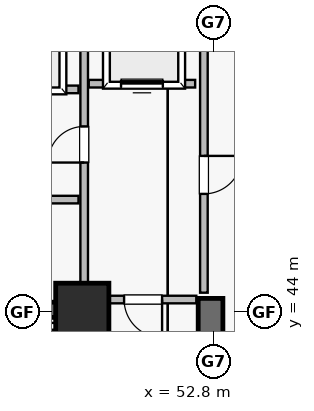
"""IFC4 building model, lengths in metres.
Left out: names, types, materials, properties, quantities, classifications, styles, units other than length and angle.
Written with IfcOpenShell. Run it as: python <this file> out.ifc"""

import sys

from ifc_helpers import new_model, si_unit, direction, frame, frame_2d, origin, origin_2d, place, context, subcontext, project, spatial, rectangle, extrude, element, fill, save


model = new_model("IFC4")
c1 = context("Model", 3, precision=1e-05, world=origin(), true_north=direction((0.0, 1.0)))
c2 = subcontext(c1, "Body", "Model", "MODEL_VIEW")
j1 = project(units=[si_unit("LENGTHUNIT", "METRE"), si_unit("PLANEANGLEUNIT", "RADIAN")], contexts=[c1])
p1 = place(None, origin())
s1 = spatial("IfcSite", under=j1, at=p1, CompositionType="ELEMENT")
p2 = place(p1, origin())
s2 = spatial("IfcBuilding", under=s1, at=p2, CompositionType="ELEMENT")
p3 = place(p2, frame((0.0, 0.0, -15.6)))
s3 = spatial("IfcBuildingStorey", under=s2, at=p3, CompositionType="ELEMENT", Elevation=-15.6)
p4 = place(p3, frame((52.725, 34.95, 0.0), z_axis=(0.0, 0.0, 1.0), x_axis=(0.0, 1.0, 0.0)))
e1 = element("IfcWall", 1, at=p4, inside=s3, PredefinedType="SHEAR", context=c2, shape_type="SweptSolid", body=[
    extrude(rectangle(XDim=9.4, YDim=0.65, at=frame_2d((4.7, 0.0))), origin(), (0.0, 0.0, 1.0), 3.58),
])
p5 = place(p3, frame((49.225, 35.4, 0.0), z_axis=(0.0, 0.0, 1.0), x_axis=(0.0, 1.0, 0.0)))
e2 = element("IfcWall", 2, at=p5, inside=s3, PredefinedType="SHEAR", context=c2, shape_type="SweptSolid", body=[
    extrude(rectangle(XDim=8.95, YDim=0.65, at=frame_2d((4.475, 0.0))), origin(), (0.0, 0.0, 1.0), 3.58),
])
p6 = place(p3, frame((45.05, 44.05, 0.0), z_axis=(0.0, 0.0, 1.0), x_axis=(1.0, 0.0, 0.0)))
e3 = element("IfcWall", 3, at=p6, inside=s3, PredefinedType="SHEAR", context=c2, shape_type="SweptSolid", body=[
    extrude(rectangle(XDim=4.2, YDim=0.4, at=frame_2d((2.1, 0.0))), origin(), (0.0, 0.0, 1.0), 3.58),
])
p7 = place(p3, frame((49.35, 44.05, 0.0), z_axis=(0.0, 0.0, 1.0), x_axis=(1.0, 0.0, 0.0)))
e4 = element("IfcColumn", 4, at=p7, inside=s3, PredefinedType="COLUMN", context=c2, shape_type="SweptSolid", body=[
    extrude(rectangle(XDim=1.4, YDim=1.4, at=origin_2d()), origin(), (0.0, 0.0, 1.0), 3.9),
])
p8 = place(p3, frame((52.55, 44.5, 0.0), z_axis=(0.0, 0.0, 1.0), x_axis=(0.0, 1.0, 0.0)))
e5 = element("IfcWall", 5, at=p8, inside=s3, PredefinedType="SOLIDWALL", context=c2, shape_type="SweptSolid", body=[
    extrude(rectangle(XDim=7.92, YDim=0.2, at=frame_2d((3.96, 0.0))), origin(), (0.0, 0.0, 1.0), 3.58),
])
p9 = place(p8, frame((2.6, 0.0, 0.0)))
e6 = element("IfcOpeningElement", 6, at=p9, cuts=e5, PredefinedType="OPENING", context=c2, shape_type="SweptSolid", body=[
    extrude(rectangle(XDim=1.0, YDim=2.15, at=frame_2d((0.5, 1.075))), frame((0.0, 0.11, 0.0), z_axis=(0.0, -1.0, 0.0), x_axis=(1.0, 0.0, 0.0)), (0.0, 0.0, 1.0), 0.22),
])
p10 = place(p3, frame((49.4, 44.5, 0.0), z_axis=(0.0, 0.0, 1.0), x_axis=(0.0, 1.0, 0.0)))
e7 = element("IfcWall", 7, at=p10, inside=s3, PredefinedType="SOLIDWALL", context=c2, shape_type="SweptSolid", body=[
    extrude(rectangle(XDim=7.92, YDim=0.2, at=frame_2d((3.96, 0.0))), origin(), (0.0, 0.0, 1.0), 3.58),
])
p11 = place(p10, frame((3.425, 0.0, 0.0)))
e8 = element("IfcOpeningElement", 8, at=p11, cuts=e7, PredefinedType="OPENING", context=c2, shape_type="SweptSolid", body=[
    extrude(rectangle(XDim=0.95, YDim=2.15, at=frame_2d((0.475, 1.075))), frame((0.0, 0.11, 0.0), z_axis=(0.0, -1.0, 0.0), x_axis=(1.0, 0.0, 0.0)), (0.0, 0.0, 1.0), 0.22),
])
p12 = place(p3, frame((44.25, 49.85, 0.0), z_axis=(0.0, 0.0, 1.0), x_axis=(1.0, 0.0, 0.0)))
e9 = element("IfcWall", 9, at=p12, inside=s3, PredefinedType="SOLIDWALL", context=c2, shape_type="SweptSolid", body=[
    extrude(rectangle(XDim=5.0, YDim=0.2, at=frame_2d((2.5, 0.0))), origin(), (0.0, 0.0, 1.0), 2.918),
])
p13 = place(p12, frame((0.525, 0.0, 0.0)))
e10 = element("IfcOpeningElement", 10, at=p13, cuts=e9, PredefinedType="OPENING", context=c2, shape_type="SweptSolid", body=[
    extrude(rectangle(XDim=0.85, YDim=2.1, at=frame_2d((0.425, 1.05))), frame((0.0, 0.11, 0.0), z_axis=(0.0, -1.0, 0.0), x_axis=(1.0, 0.0, 0.0)), (0.0, 0.0, 1.0), 0.22),
])
p14 = place(p12, frame((2.95, 0.0, 0.0)))
e11 = element("IfcOpeningElement", 11, at=p14, cuts=e9, PredefinedType="OPENING", context=c2, shape_type="SweptSolid", body=[
    extrude(rectangle(XDim=1.1, YDim=2.15, at=frame_2d((0.55, 1.075))), frame((0.0, 0.11, 0.0), z_axis=(0.0, -1.0, 0.0), x_axis=(1.0, 0.0, 0.0)), (0.0, 0.0, 1.0), 0.22),
])
p15 = place(p3, frame((45.32, 46.95, 0.0), z_axis=(0.0, 0.0, 1.0), x_axis=(1.0, 0.0, 0.0)))
e12 = element("IfcWall", 12, at=p15, inside=s3, PredefinedType="SOLIDWALL", context=c2, shape_type="SweptSolid", body=[
    extrude(rectangle(XDim=3.93, YDim=0.2, at=frame_2d((1.965, 0.0))), origin(), (0.0, 0.0, 1.0), 2.918),
])
p16 = place(p15, frame((1.475, 0.0, 0.0)))
e13 = element("IfcOpeningElement", 13, at=p16, cuts=e12, PredefinedType="OPENING", context=c2, shape_type="SweptSolid", body=[
    extrude(rectangle(XDim=0.95, YDim=2.15, at=frame_2d((0.475, 1.075))), frame((0.0, 0.11, 0.0), z_axis=(0.0, -1.0, 0.0), x_axis=(1.0, 0.0, 0.0)), (0.0, 0.0, 1.0), 0.22),
])
p17 = place(p3, frame((49.55, 44.32, 0.0), z_axis=(0.0, 0.0, 1.0), x_axis=(1.0, 0.0, 0.0)))
e14 = element("IfcWall", 14, at=p17, inside=s3, PredefinedType="SOLIDWALL", context=c2, shape_type="SweptSolid", body=[
    extrude(rectangle(XDim=2.8, YDim=0.2, at=frame_2d((1.4, 0.0))), origin(), (0.0, 0.0, 1.0), 3.58),
])
p18 = place(p17, frame((0.9, 0.0, 0.0)))
e15 = element("IfcOpeningElement", 15, at=p18, cuts=e14, PredefinedType="OPENING", context=c2, shape_type="SweptSolid", body=[
    extrude(rectangle(XDim=1.0, YDim=2.15, at=frame_2d((0.5, 1.075))), frame((0.0, 0.11, 0.0), z_axis=(0.0, -1.0, 0.0), x_axis=(1.0, 0.0, 0.0)), (0.0, 0.0, 1.0), 0.22),
])
p19 = place(p3, frame((49.52, 50.0, 0.0), z_axis=(0.0, 0.0, 1.0), x_axis=(1.0, 0.0, 0.0)))
e16 = element("IfcWall", 16, at=p19, inside=s3, PredefinedType="SOLIDWALL", context=c2, shape_type="SweptSolid", body=[
    extrude(rectangle(XDim=2.8, YDim=0.2, at=frame_2d((1.4, 0.0))), origin(), (0.0, 0.0, 1.0), 3.58),
])
p20 = place(p19, frame((0.85, 0.0, 0.0)))
e17 = element("IfcOpeningElement", 17, at=p20, cuts=e16, PredefinedType="OPENING", context=c2, shape_type="SweptSolid", body=[
    extrude(rectangle(XDim=1.1, YDim=2.15, at=frame_2d((0.55, 1.075))), frame((0.0, 0.11, 0.0), z_axis=(0.0, -1.0, 0.0), x_axis=(1.0, 0.0, 0.0)), (0.0, 0.0, 1.0), 0.22),
])
p21 = place(p18, frame((1.0, 0.0, 0.0), z_axis=(0.0, 0.0, 1.0), x_axis=(-1.0, 0.0, 0.0)))
e18 = element("IfcDoor", 18, at=p21, inside=s3, OperationType="SINGLE_SWING_RIGHT", PredefinedType="DOOR", context=c2, shape_type="SweptSolid", body=[
    extrude(rectangle(XDim=1.0, YDim=2.15, at=frame_2d((0.5, 1.075))), frame((0.0, 0.025, 0.0), z_axis=(0.0, -1.0, 0.0), x_axis=(1.0, 0.0, 0.0)), (0.0, 0.0, 1.0), 0.05),
])
fill(e15, e18)
p22 = place(p9, frame((1.0, 0.0, 0.0), z_axis=(0.0, 0.0, 1.0), x_axis=(-1.0, 0.0, 0.0)))
e19 = element("IfcDoor", 19, at=p22, inside=s3, OperationType="SINGLE_SWING_RIGHT", PredefinedType="DOOR", context=c2, shape_type="SweptSolid", body=[
    extrude(rectangle(XDim=1.0, YDim=2.15, at=frame_2d((0.5, 1.075))), frame((0.0, 0.025, 0.0), z_axis=(0.0, -1.0, 0.0), x_axis=(1.0, 0.0, 0.0)), (0.0, 0.0, 1.0), 0.05),
])
fill(e6, e19)
p23 = place(p11, origin())
e20 = element("IfcDoor", 20, at=p23, inside=s3, OperationType="SINGLE_SWING_LEFT", PredefinedType="DOOR", context=c2, shape_type="SweptSolid", body=[
    extrude(rectangle(XDim=0.95, YDim=2.15, at=frame_2d((0.475, 1.075))), frame((0.0, 0.025, 0.0), z_axis=(0.0, -1.0, 0.0), x_axis=(1.0, 0.0, 0.0)), (0.0, 0.0, 1.0), 0.05),
])
fill(e8, e20)
p24 = place(p20, origin())
e21 = element("IfcDoor", 21, at=p24, inside=s3, OperationType="SLIDING_TO_LEFT", PredefinedType="DOOR", context=c2, shape_type="SweptSolid", body=[
    extrude(rectangle(XDim=1.1, YDim=2.15, at=frame_2d((0.55, 1.075))), frame((0.0, 0.025, 0.0), z_axis=(0.0, -1.0, 0.0), x_axis=(1.0, 0.0, 0.0)), (0.0, 0.0, 1.0), 0.05),
])
fill(e17, e21)
save(model, sys.argv[1])
